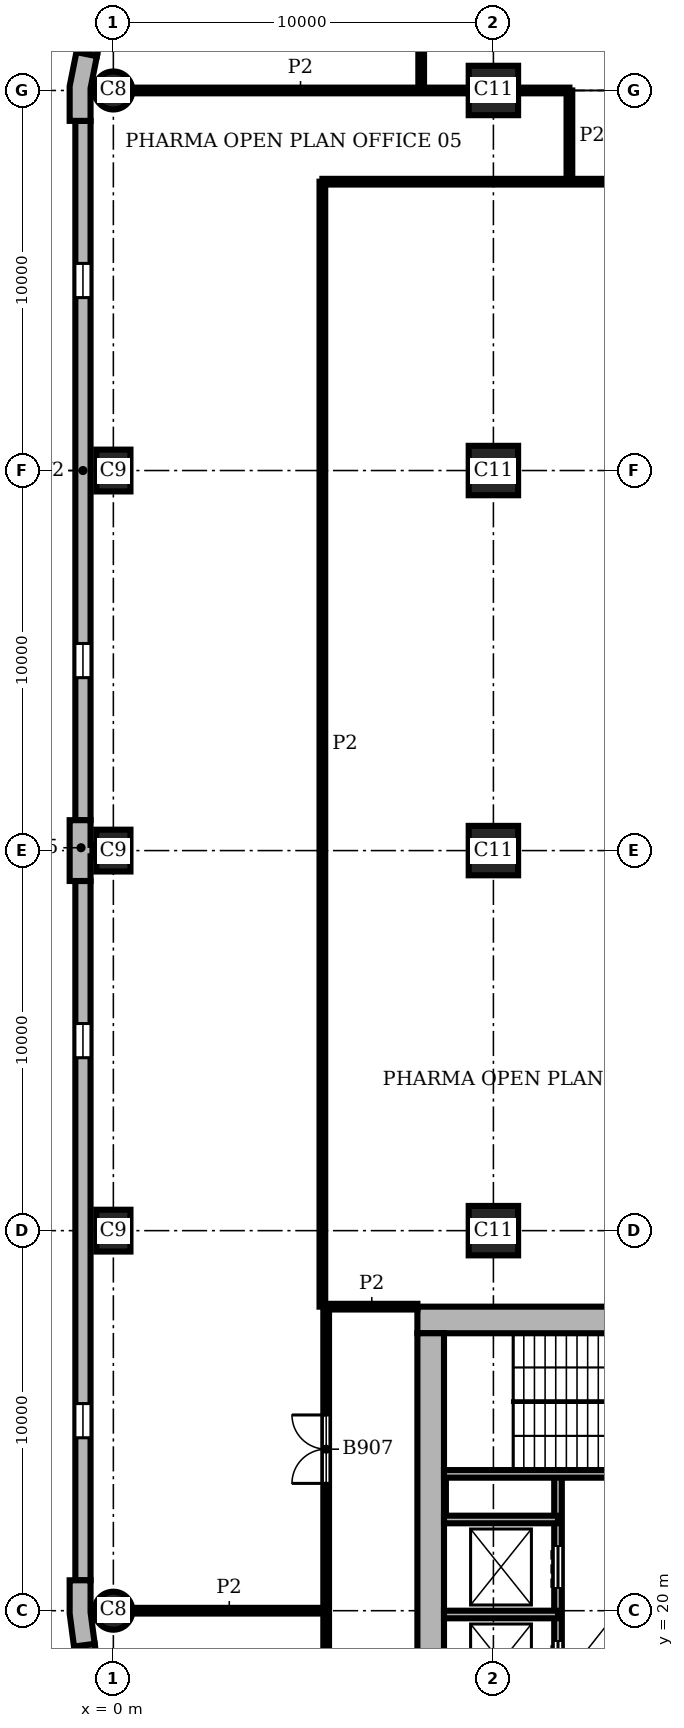
"""IFC4 building model, lengths in metres.
Left out: names, types, materials, properties, quantities, classifications, styles, units other than length and angle.
Written with IfcOpenShell. Run it as: python <this file> out.ifc"""

import sys

from ifc_helpers import new_model, si_unit, direction, frame, frame_2d, origin, origin_2d, place, context, subcontext, project, spatial, polyline, rectangle, circle, outline, extrude, element, fill, save


model = new_model("IFC4")
c1 = context("Model", 3, precision=1e-05, world=origin(), true_north=direction((0.0, 1.0)))
c2 = subcontext(c1, "Body", "Model", "MODEL_VIEW")
j1 = project(units=[si_unit("LENGTHUNIT", "METRE"), si_unit("PLANEANGLEUNIT", "RADIAN")], contexts=[c1])
p1 = place(None, origin())
s1 = spatial("IfcSite", under=j1, at=p1, CompositionType="ELEMENT")
p2 = place(p1, origin())
s2 = spatial("IfcBuilding", under=s1, at=p2, CompositionType="ELEMENT")
p3 = place(p2, frame((0.0, 0.0, 233.1)))
s3 = spatial("IfcBuildingStorey", under=s2, at=p3, CompositionType="ELEMENT", Elevation=233.1)
p4 = place(p3, frame((0.0, 60.0, 0.0), z_axis=(0.0, 0.0, 1.0), x_axis=(1.0, 0.0, 0.0)))
e1 = element("IfcColumn", 1, at=p4, inside=s3, PredefinedType="COLUMN", context=c2, shape_type="SweptSolid", body=[
    extrude(circle(Radius=0.5, at=origin_2d()), origin(), (0.0, 0.0, 1.0), 3.9),
])
for number, where, z_axis, x_axis in (
    (2, (0.0, 50.0, 0.0), (0.0, 0.0, 1.0), (0.0, 1.0, 0.0)),
    (3, (0.0, 40.0, 0.0), (0.0, 0.0, 1.0), (0.0, 1.0, 0.0)),
    (4, (0.0, 30.0, 0.0), (0.0, 0.0, 1.0), (0.0, 1.0, 0.0)),
):
    element("IfcColumn", number, at=place(p3, frame(where, z_axis=z_axis, x_axis=x_axis)), inside=s3, PredefinedType="COLUMN", context=c2, shape_type="SweptSolid", body=[
        extrude(rectangle(XDim=1.1, YDim=0.9, at=origin_2d()), origin(), (0.0, 0.0, 1.0), 3.9),
    ])
p5 = place(p3, frame((0.0, 20.0, 0.0), z_axis=(0.0, 0.0, 1.0), x_axis=(1.0, 0.0, 0.0)))
e5 = element("IfcColumn", 5, at=p5, inside=s3, PredefinedType="COLUMN", context=c2, shape_type="SweptSolid", body=[
    extrude(circle(Radius=0.5, at=origin_2d()), origin(), (0.0, 0.0, 1.0), 3.9),
])
for number, where, z_axis, x_axis in (
    (6, (10.0, 30.0, 0.0), (0.0, 0.0, 1.0), (1.0, 0.0, 0.0)),
    (7, (10.0, 40.0, 0.0), (0.0, 0.0, 1.0), (1.0, 0.0, 0.0)),
    (8, (10.0, 50.0, 0.0), (0.0, 0.0, 1.0), (1.0, 0.0, 0.0)),
    (9, (10.0, 60.0, 0.0), (0.0, 0.0, 1.0), (1.0, 0.0, 0.0)),
):
    element("IfcColumn", number, at=place(p3, frame(where, z_axis=z_axis, x_axis=x_axis)), inside=s3, PredefinedType="COLUMN", context=c2, shape_type="SweptSolid", body=[
        extrude(rectangle(XDim=1.3, YDim=1.3, at=origin_2d()), origin(), (0.0, 0.0, 1.0), 3.9),
    ])
p6 = place(p3, frame((28.0, 27.65, 0.0), z_axis=(0.0, 0.0, 1.0), x_axis=(-1.0, 0.0, 0.0)))
e10 = element("IfcWall", 10, at=p6, inside=s3, PredefinedType="SHEAR", context=c2, shape_type="SweptSolid", body=[
    extrude(rectangle(XDim=20.0, YDim=0.7, at=frame_2d((10.0, 0.0))), origin(), (0.0, 0.0, 1.0), 3.9),
])
p7 = place(p3, frame((8.35, 27.3, 0.0), z_axis=(0.0, 0.0, 1.0), x_axis=(0.0, -1.0, 0.0)))
e11 = element("IfcWall", 11, at=p7, inside=s3, PredefinedType="SHEAR", context=c2, shape_type="SweptSolid", body=[
    extrude(rectangle(XDim=18.6, YDim=0.7, at=frame_2d((9.3, 0.0))), origin(), (0.0, 0.0, 1.0), 3.9),
])
p8 = place(p3, origin())
e12 = element("IfcWall", 12, at=p8, inside=s3, PredefinedType="SOLIDWALL", context=c2, shape_type="SweptSolid", body=[
    extrude(outline(polyline([(-0.825, 60.98), (-0.972, 61.009), (-1.15, 60.113), (-1.15, 59.2), (-1.0, 59.2), (-0.6, 59.2), (-0.6, 60.059), (-0.432, 60.902), (-0.825, 60.98)])), origin(), (0.0, 0.0, 1.0), 3.9),
])
e13 = element("IfcWall", 13, at=p8, inside=s3, PredefinedType="SOLIDWALL", context=c2, shape_type="SweptSolid", body=[
    extrude(outline(polyline([(-0.6, 39.2), (-0.6, 39.85), (-0.55, 39.85), (-0.55, 40.15), (-0.6, 40.15), (-0.6, 40.8), (-1.0, 40.8), (-1.15, 40.8), (-1.15, 40.0), (-1.15, 39.2), (-1.0, 39.2), (-0.6, 39.2)])), origin(), (0.0, 0.0, 1.0), 3.9),
])
e14 = element("IfcWall", 14, at=p8, inside=s3, PredefinedType="SOLIDWALL", context=c2, shape_type="SweptSolid", body=[
    extrude(outline(polyline([(-1.0, 20.8), (-1.15, 20.8), (-1.15, 19.925), (-1.036, 19.057), (-0.887, 19.076), (-0.49, 19.128), (-0.6, 19.961), (-0.6, 20.8), (-1.0, 20.8)])), origin(), (0.0, 0.0, 1.0), 3.9),
])
p9 = place(p3, frame((0.299, 65.602, 0.0), z_axis=(0.0, 0.0, 1.0), x_axis=(-0.195098533057, -0.98078364709, 0.0)))
e15 = element("IfcWall", 15, at=p9, inside=s3, PredefinedType="SOLIDWALL", context=c2, shape_type="SweptSolid", body=[
    extrude(rectangle(XDim=4.753, YDim=0.4, at=frame_2d((2.376, 0.0))), origin(), (0.0, 0.0, 1.0), 3.9),
])
p10 = place(p9, frame((0.226, 0.0, 0.9)))
e16 = element("IfcOpeningElement", 16, at=p10, cuts=e15, PredefinedType="OPENING", context=c2, shape_type="SweptSolid", body=[
    extrude(rectangle(XDim=4.3, YDim=2.35, at=frame_2d((2.15, 1.175))), frame((0.0, 0.21, 0.0), z_axis=(0.0, -1.0, 0.0), x_axis=(1.0, 0.0, 0.0)), (0.0, 0.0, 1.0), 0.42),
])
p11 = place(p3, frame((-0.8, 59.2, 0.0), z_axis=(0.0, 0.0, 1.0), x_axis=(0.0, -1.0, 0.0)))
e17 = element("IfcWall", 17, at=p11, inside=s3, PredefinedType="SOLIDWALL", context=c2, shape_type="SweptSolid", body=[
    extrude(rectangle(XDim=18.4, YDim=0.4, at=frame_2d((9.2, 0.0))), origin(), (0.0, 0.0, 1.0), 3.9),
])
p12 = place(p11, frame((3.75, 0.0, 0.9)))
e18 = element("IfcOpeningElement", 18, at=p12, cuts=e17, PredefinedType="OPENING", context=c2, shape_type="SweptSolid", body=[
    extrude(rectangle(XDim=0.9, YDim=2.35, at=frame_2d((0.45, 1.175))), frame((0.0, 0.21, 0.0), z_axis=(0.0, -1.0, 0.0), x_axis=(1.0, 0.0, 0.0)), (0.0, 0.0, 1.0), 0.42),
])
p13 = place(p11, frame((13.75, 0.0, 0.9)))
e19 = element("IfcOpeningElement", 19, at=p13, cuts=e17, PredefinedType="OPENING", context=c2, shape_type="SweptSolid", body=[
    extrude(rectangle(XDim=0.9, YDim=2.35, at=frame_2d((0.45, 1.175))), frame((0.0, 0.21, 0.0), z_axis=(0.0, -1.0, 0.0), x_axis=(1.0, 0.0, 0.0)), (0.0, 0.0, 1.0), 0.42),
])
p14 = place(p3, frame((-0.8, 39.2, 0.0), z_axis=(0.0, 0.0, 1.0), x_axis=(0.0, -1.0, 0.0)))
e20 = element("IfcWall", 20, at=p14, inside=s3, PredefinedType="SOLIDWALL", context=c2, shape_type="SweptSolid", body=[
    extrude(rectangle(XDim=18.4, YDim=0.4, at=frame_2d((9.2, 0.0))), origin(), (0.0, 0.0, 1.0), 3.9),
])
p15 = place(p14, frame((3.75, 0.0, 0.9)))
e21 = element("IfcOpeningElement", 21, at=p15, cuts=e20, PredefinedType="OPENING", context=c2, shape_type="SweptSolid", body=[
    extrude(rectangle(XDim=0.9, YDim=2.35, at=frame_2d((0.45, 1.175))), frame((0.0, 0.21, 0.0), z_axis=(0.0, -1.0, 0.0), x_axis=(1.0, 0.0, 0.0)), (0.0, 0.0, 1.0), 0.42),
])
p16 = place(p14, frame((13.75, 0.0, 0.9)))
e22 = element("IfcOpeningElement", 22, at=p16, cuts=e20, PredefinedType="OPENING", context=c2, shape_type="SweptSolid", body=[
    extrude(rectangle(XDim=0.9, YDim=2.35, at=frame_2d((0.45, 1.175))), frame((0.0, 0.21, 0.0), z_axis=(0.0, -1.0, 0.0), x_axis=(1.0, 0.0, 0.0)), (0.0, 0.0, 1.0), 0.42),
])
p17 = place(p3, frame((-0.689, 19.102, 0.0), z_axis=(0.0, 0.0, 1.0), x_axis=(0.130514280502, -0.991446429508, 0.0)))
e23 = element("IfcWall", 23, at=p17, inside=s3, PredefinedType="SOLIDWALL", context=c2, shape_type="SweptSolid", body=[
    extrude(rectangle(XDim=4.121, YDim=0.4, at=frame_2d((2.061, 0.0))), origin(), (0.0, 0.0, 1.0), 3.9),
])
p18 = place(p17, frame((1.611, 0.0, 0.9)))
e24 = element("IfcOpeningElement", 24, at=p18, cuts=e23, PredefinedType="OPENING", context=c2, shape_type="SweptSolid", body=[
    extrude(rectangle(XDim=0.9, YDim=2.35, at=frame_2d((0.45, 1.175))), frame((0.0, 0.21, 0.0), z_axis=(0.0, -1.0, 0.0), x_axis=(1.0, 0.0, 0.0)), (0.0, 0.0, 1.0), 0.42),
])
for number, where, z_axis, x_axis in (
    (25, (8.7, 19.9, 0.0), (0.0, 0.0, 1.0), (1.0, 0.0, 0.0)),
    (26, (8.7, 22.4, 0.0), (0.0, 0.0, 1.0), (1.0, 0.0, 0.0)),
):
    element("IfcWall", number, at=place(p3, frame(where, z_axis=z_axis, x_axis=x_axis)), inside=s3, PredefinedType="SHEAR", context=c2, shape_type="SweptSolid", body=[
        extrude(rectangle(XDim=3.0, YDim=0.2, at=frame_2d((1.5, 0.0))), origin(), (0.0, 0.0, 1.0), 3.45),
    ])
p19 = place(p3, frame((8.7, 23.6, 0.0), z_axis=(0.0, 0.0, 1.0), x_axis=(1.0, 0.0, 0.0)))
e27 = element("IfcWall", 27, at=p19, inside=s3, PredefinedType="SHEAR", context=c2, shape_type="SweptSolid", body=[
    extrude(rectangle(XDim=5.1, YDim=0.2, at=frame_2d((2.55, 0.0))), origin(), (0.0, 0.0, 1.0), 3.45),
])
p20 = place(p3, frame((11.7, 12.4, 0.0), z_axis=(0.0, 0.0, 1.0), x_axis=(0.0, 1.0, 0.0)))
e28 = element("IfcWall", 28, at=p20, inside=s3, PredefinedType="SHEAR", context=c2, shape_type="SweptSolid", body=[
    extrude(rectangle(XDim=11.2, YDim=0.2, at=frame_2d((5.6, 0.0))), origin(), (0.0, 0.0, 1.0), 3.45),
])
p21 = place(p20, frame((0.7, 0.0, 0.0)))
e29 = element("IfcOpeningElement", 29, at=p21, cuts=e28, PredefinedType="OPENING", context=c2, shape_type="SweptSolid", body=[
    extrude(rectangle(XDim=1.1, YDim=2.1, at=frame_2d((0.55, 1.05))), frame((0.0, 0.11, 0.0), z_axis=(0.0, -1.0, 0.0), x_axis=(1.0, 0.0, 0.0)), (0.0, 0.0, 1.0), 0.22),
])
p22 = place(p20, frame((3.2, 0.0, 0.0)))
e30 = element("IfcOpeningElement", 30, at=p22, cuts=e28, PredefinedType="OPENING", context=c2, shape_type="SweptSolid", body=[
    extrude(rectangle(XDim=1.1, YDim=2.1, at=frame_2d((0.55, 1.05))), frame((0.0, 0.11, 0.0), z_axis=(0.0, -1.0, 0.0), x_axis=(1.0, 0.0, 0.0)), (0.0, 0.0, 1.0), 0.22),
])
p23 = place(p20, frame((5.7, 0.0, 0.0)))
e31 = element("IfcOpeningElement", 31, at=p23, cuts=e28, PredefinedType="OPENING", context=c2, shape_type="SweptSolid", body=[
    extrude(rectangle(XDim=1.1, YDim=2.1, at=frame_2d((0.55, 1.05))), frame((0.0, 0.11, 0.0), z_axis=(0.0, -1.0, 0.0), x_axis=(1.0, 0.0, 0.0)), (0.0, 0.0, 1.0), 0.22),
])
p24 = place(p20, frame((8.2, 0.0, 0.0)))
e32 = element("IfcOpeningElement", 32, at=p24, cuts=e28, PredefinedType="OPENING", context=c2, shape_type="SweptSolid", body=[
    extrude(rectangle(XDim=1.1, YDim=2.1, at=frame_2d((0.55, 1.05))), frame((0.0, 0.11, 0.0), z_axis=(0.0, -1.0, 0.0), x_axis=(1.0, 0.0, 0.0)), (0.0, 0.0, 1.0), 0.22),
])
p25 = place(p3, frame((5.5, 28.0, 0.0), z_axis=(0.0, 0.0, 1.0), x_axis=(0.0, 1.0, 0.0)))
e33 = element("IfcWall", 33, at=p25, inside=s3, PredefinedType="PARTITIONING", context=c2, shape_type="SweptSolid", body=[
    extrude(rectangle(XDim=29.6, YDim=0.15, at=frame_2d((14.8, 0.0))), origin(), (0.0, 0.0, 1.0), 3.45),
])
p26 = place(p3, frame((5.6, 5.6, 0.0), z_axis=(0.0, 0.0, 1.0), x_axis=(0.0, 1.0, 0.0)))
e34 = element("IfcWall", 34, at=p26, inside=s3, PredefinedType="PARTITIONING", context=c2, shape_type="SweptSolid", body=[
    extrude(rectangle(XDim=22.4, YDim=0.15, at=frame_2d((11.2, 0.0))), origin(), (0.0, 0.0, 1.0), 3.45),
])
p27 = place(p26, frame((5.35, 0.0, 0.0)))
e35 = element("IfcOpeningElement", 35, at=p27, cuts=e34, PredefinedType="OPENING", context=c2, shape_type="SweptSolid", body=[
    extrude(rectangle(XDim=0.8, YDim=2.1, at=frame_2d((0.4, 1.05))), frame((0.0, 0.085, 0.0), z_axis=(0.0, -1.0, 0.0), x_axis=(1.0, 0.0, 0.0)), (0.0, 0.0, 1.0), 0.17),
])
p28 = place(p26, frame((11.5, 0.0, 0.0)))
e36 = element("IfcOpeningElement", 36, at=p28, cuts=e34, PredefinedType="OPENING", context=c2, shape_type="SweptSolid", body=[
    extrude(rectangle(XDim=0.8, YDim=2.1, at=frame_2d((0.4, 1.05))), frame((0.0, 0.085, 0.0), z_axis=(0.0, -1.0, 0.0), x_axis=(1.0, 0.0, 0.0)), (0.0, 0.0, 1.0), 0.17),
])
p29 = place(p26, frame((17.75, 0.0, 0.0)))
e37 = element("IfcOpeningElement", 37, at=p29, cuts=e34, PredefinedType="OPENING", context=c2, shape_type="SweptSolid", body=[
    extrude(rectangle(XDim=1.8, YDim=2.1, at=frame_2d((0.9, 1.05))), frame((0.0, 0.085, 0.0), z_axis=(0.0, -1.0, 0.0), x_axis=(1.0, 0.0, 0.0)), (0.0, 0.0, 1.0), 0.17),
])
p30 = place(p3, frame((8.1, 60.0, 0.0), z_axis=(0.0, 0.0, 1.0), x_axis=(0.0, 1.0, 0.0)))
e38 = element("IfcWall", 38, at=p30, inside=s3, PredefinedType="PARTITIONING", context=c2, shape_type="SweptSolid", body=[
    extrude(rectangle(XDim=6.4, YDim=0.15, at=frame_2d((3.2, 0.0))), origin(), (0.0, 0.0, 1.0), 3.45),
])
p31 = place(p30, frame((2.35, 0.0, 0.0)))
e39 = element("IfcOpeningElement", 39, at=p31, cuts=e38, PredefinedType="OPENING", context=c2, shape_type="SweptSolid", body=[
    extrude(rectangle(XDim=1.0, YDim=2.1, at=frame_2d((0.5, 1.05))), frame((0.0, 0.085, 0.0), z_axis=(0.0, -1.0, 0.0), x_axis=(1.0, 0.0, 0.0)), (0.0, 0.0, 1.0), 0.17),
])
p32 = place(p3, frame((12.0, 57.6, 0.0), z_axis=(0.0, 0.0, 1.0), x_axis=(0.0, 1.0, 0.0)))
e40 = element("IfcWall", 40, at=p32, inside=s3, PredefinedType="PARTITIONING", context=c2, shape_type="SweptSolid", body=[
    extrude(rectangle(XDim=2.4, YDim=0.15, at=frame_2d((1.2, 0.0))), origin(), (0.0, 0.0, 1.0), 3.45),
])
p33 = place(p3, frame((0.5, 20.0, 0.0), z_axis=(0.0, 0.0, 1.0), x_axis=(1.0, 0.0, 0.0)))
e41 = element("IfcWall", 41, at=p33, inside=s3, PredefinedType="PARTITIONING", context=c2, shape_type="SweptSolid", body=[
    extrude(rectangle(XDim=5.1, YDim=0.15, at=frame_2d((2.55, 0.0))), origin(), (0.0, 0.0, 1.0), 3.45),
])
p34 = place(p3, frame((5.6, 28.0, 0.0), z_axis=(0.0, 0.0, 1.0), x_axis=(1.0, 0.0, 0.0)))
e42 = element("IfcWall", 42, at=p34, inside=s3, PredefinedType="PARTITIONING", context=c2, shape_type="SweptSolid", body=[
    extrude(rectangle(XDim=2.4, YDim=0.15, at=frame_2d((1.2, 0.0))), origin(), (0.0, 0.0, 1.0), 3.45),
])
p35 = place(p3, frame((5.5, 57.6, 0.0), z_axis=(0.0, 0.0, 1.0), x_axis=(1.0, 0.0, 0.0)))
e43 = element("IfcWall", 43, at=p35, inside=s3, PredefinedType="PARTITIONING", context=c2, shape_type="SweptSolid", body=[
    extrude(rectangle(XDim=20.5, YDim=0.15, at=frame_2d((10.25, 0.0))), origin(), (0.0, 0.0, 1.0), 3.45),
])
p36 = place(p35, frame((8.1, 0.0, 0.0)))
e44 = element("IfcOpeningElement", 44, at=p36, cuts=e43, PredefinedType="OPENING", context=c2, shape_type="SweptSolid", body=[
    extrude(rectangle(XDim=1.8, YDim=2.1, at=frame_2d((0.9, 1.05))), frame((0.0, 0.085, 0.0), z_axis=(0.0, -1.0, 0.0), x_axis=(1.0, 0.0, 0.0)), (0.0, 0.0, 1.0), 0.17),
])
p37 = place(p3, frame((0.5, 60.0, 0.0), z_axis=(0.0, 0.0, 1.0), x_axis=(1.0, 0.0, 0.0)))
e45 = element("IfcWall", 45, at=p37, inside=s3, PredefinedType="PARTITIONING", context=c2, shape_type="SweptSolid", body=[
    extrude(rectangle(XDim=8.85, YDim=0.15, at=frame_2d((4.425, 0.0))), origin(), (0.0, 0.0, 1.0), 3.45),
])
p38 = place(p3, frame((10.65, 60.0, 0.0), z_axis=(0.0, 0.0, 1.0), x_axis=(1.0, 0.0, 0.0)))
e46 = element("IfcWall", 46, at=p38, inside=s3, PredefinedType="PARTITIONING", context=c2, shape_type="SweptSolid", body=[
    extrude(rectangle(XDim=1.35, YDim=0.15, at=frame_2d((0.675, 0.0))), origin(), (0.0, 0.0, 1.0), 3.45),
])
p39 = place(p12, origin())
e47 = element("IfcWindow", 47, at=p39, inside=s3, PartitioningType="SINGLE_PANEL", PredefinedType="WINDOW", context=c2, shape_type="SweptSolid", body=[
    extrude(rectangle(XDim=0.9, YDim=2.35, at=frame_2d((0.45, 1.175))), frame((0.0, 0.16, 0.0), z_axis=(0.0, -1.0, 0.0), x_axis=(1.0, 0.0, 0.0)), (0.0, 0.0, 1.0), 0.06),
])
fill(e18, e47)
p40 = place(p13, origin())
e48 = element("IfcWindow", 48, at=p40, inside=s3, PartitioningType="SINGLE_PANEL", PredefinedType="WINDOW", context=c2, shape_type="SweptSolid", body=[
    extrude(rectangle(XDim=0.9, YDim=2.35, at=frame_2d((0.45, 1.175))), frame((0.0, 0.16, 0.0), z_axis=(0.0, -1.0, 0.0), x_axis=(1.0, 0.0, 0.0)), (0.0, 0.0, 1.0), 0.06),
])
fill(e19, e48)
p41 = place(p15, origin())
e49 = element("IfcWindow", 49, at=p41, inside=s3, PartitioningType="SINGLE_PANEL", PredefinedType="WINDOW", context=c2, shape_type="SweptSolid", body=[
    extrude(rectangle(XDim=0.9, YDim=2.35, at=frame_2d((0.45, 1.175))), frame((0.0, 0.16, 0.0), z_axis=(0.0, -1.0, 0.0), x_axis=(1.0, 0.0, 0.0)), (0.0, 0.0, 1.0), 0.06),
])
fill(e21, e49)
p42 = place(p16, origin())
e50 = element("IfcWindow", 50, at=p42, inside=s3, PartitioningType="SINGLE_PANEL", PredefinedType="WINDOW", context=c2, shape_type="SweptSolid", body=[
    extrude(rectangle(XDim=0.9, YDim=2.35, at=frame_2d((0.45, 1.175))), frame((0.0, 0.16, 0.0), z_axis=(0.0, -1.0, 0.0), x_axis=(1.0, 0.0, 0.0)), (0.0, 0.0, 1.0), 0.06),
])
fill(e22, e50)
p43 = place(p23, origin())
e51 = element("IfcDoor", 51, at=p43, inside=s3, OperationType="DOUBLE_DOOR_SLIDING", PredefinedType="DOOR", context=c2, shape_type="SweptSolid", body=[
    extrude(rectangle(XDim=1.1, YDim=2.1, at=frame_2d((0.55, 1.05))), frame((0.0, 0.025, 0.0), z_axis=(0.0, -1.0, 0.0), x_axis=(1.0, 0.0, 0.0)), (0.0, 0.0, 1.0), 0.05),
])
fill(e31, e51)
p44 = place(p24, origin())
e52 = element("IfcDoor", 52, at=p44, inside=s3, OperationType="DOUBLE_DOOR_SLIDING", PredefinedType="DOOR", context=c2, shape_type="SweptSolid", body=[
    extrude(rectangle(XDim=1.1, YDim=2.1, at=frame_2d((0.55, 1.05))), frame((0.0, 0.025, 0.0), z_axis=(0.0, -1.0, 0.0), x_axis=(1.0, 0.0, 0.0)), (0.0, 0.0, 1.0), 0.05),
])
fill(e32, e52)
p45 = place(p29, origin())
e53 = element("IfcDoor", 53, at=p45, inside=s3, OperationType="DOUBLE_DOOR_SINGLE_SWING", PredefinedType="DOOR", context=c2, shape_type="SweptSolid", body=[
    extrude(rectangle(XDim=1.8, YDim=2.1, at=frame_2d((0.9, 1.05))), frame((0.0, 0.025, 0.0), z_axis=(0.0, -1.0, 0.0), x_axis=(1.0, 0.0, 0.0)), (0.0, 0.0, 1.0), 0.05),
])
fill(e37, e53)
save(model, sys.argv[1])
